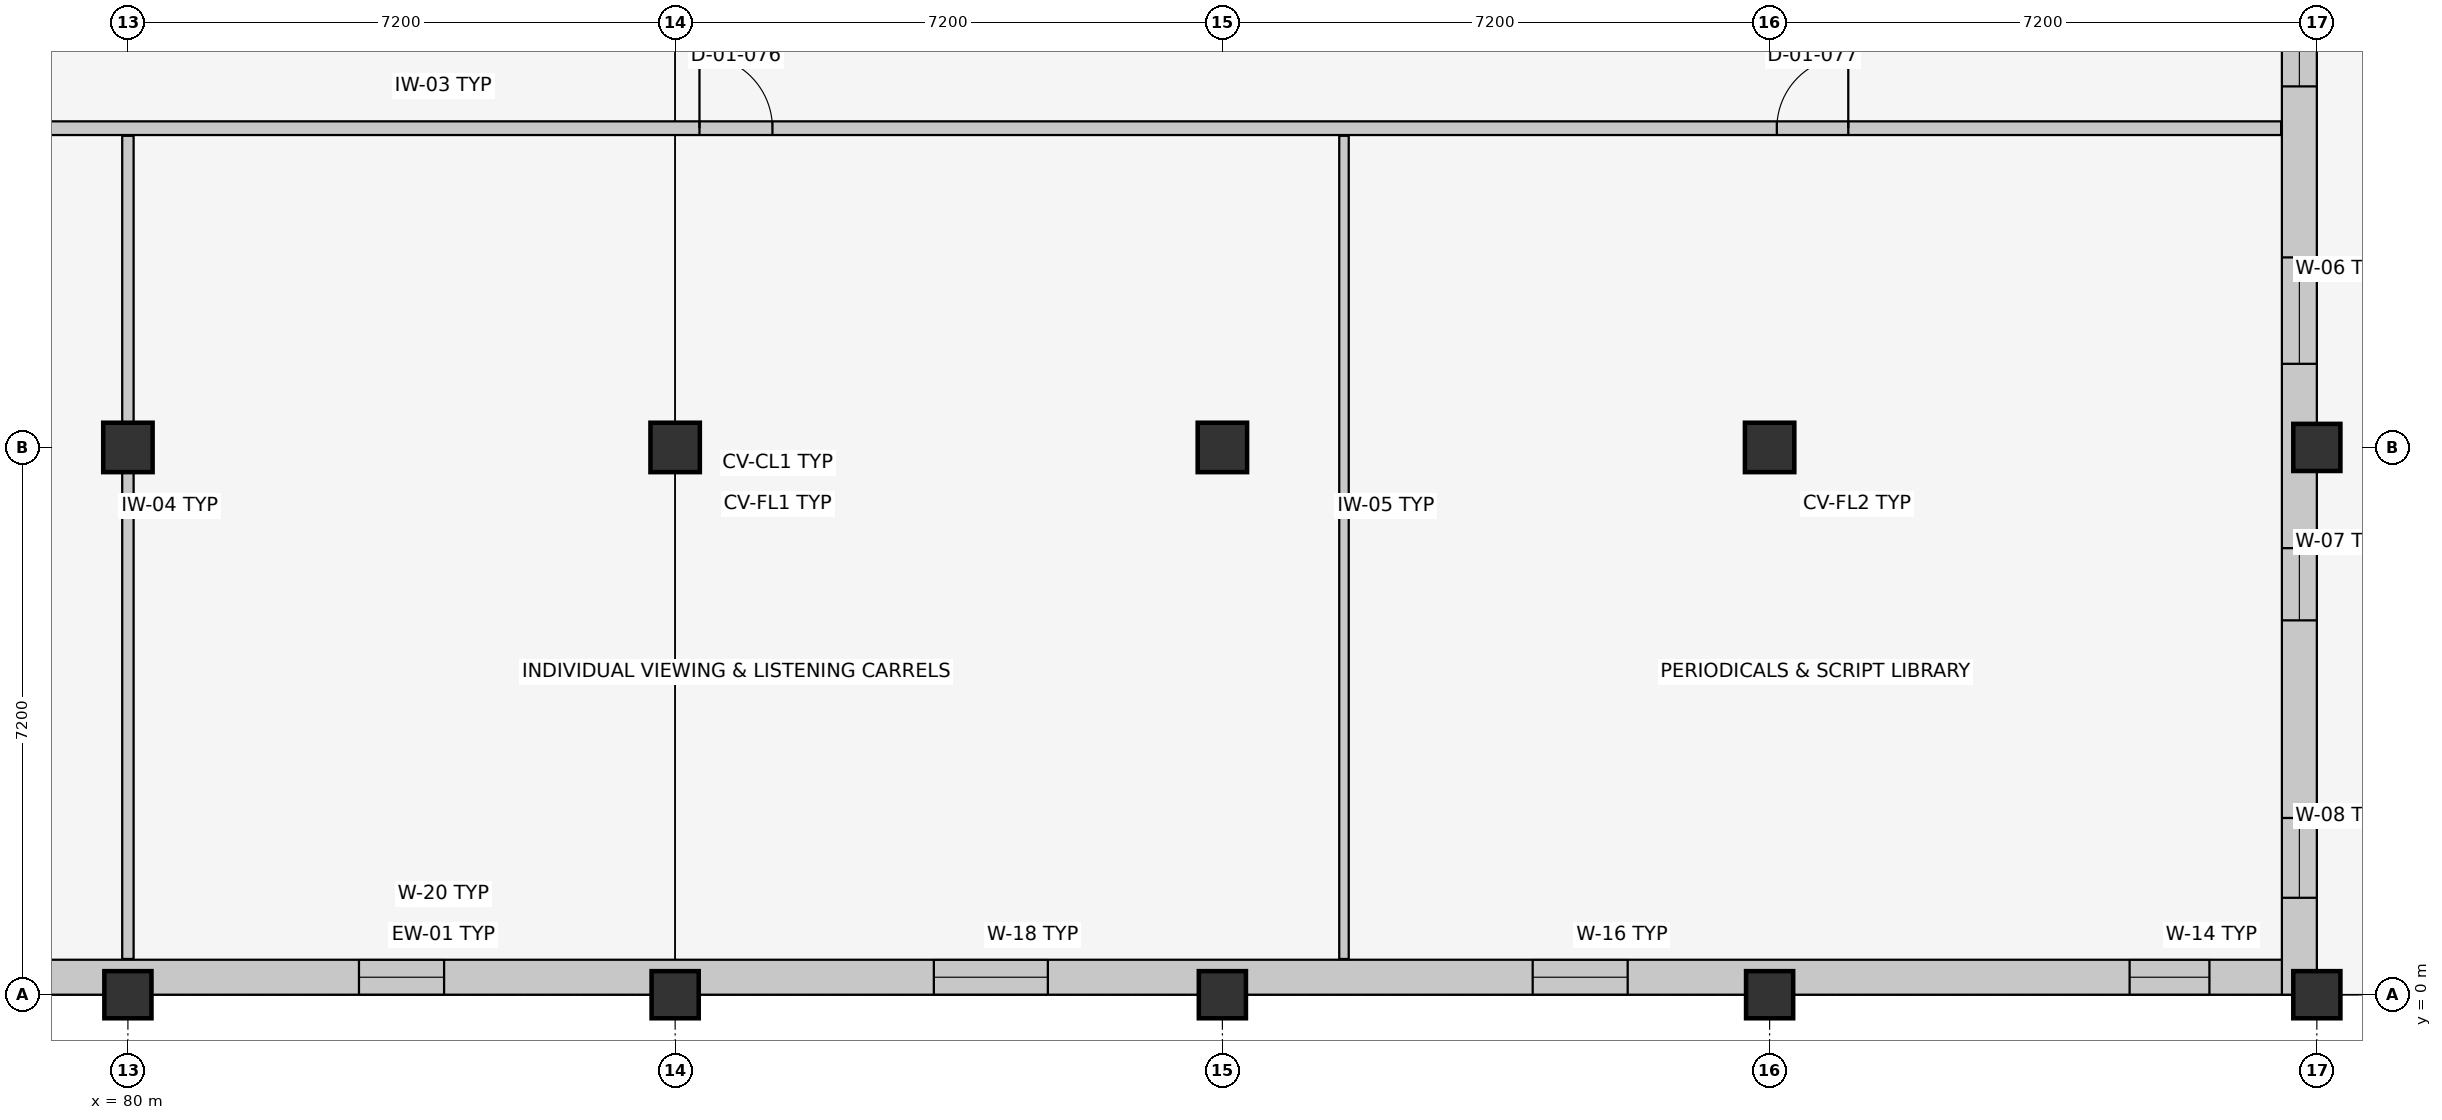
"""IFC4 building model, lengths in metres.
Left out: names, types, materials, properties, quantities, classifications, styles, units other than length and angle.
Written with IfcOpenShell. Run it as: python <this file> out.ifc"""

import sys

from ifc_helpers import new_model, si_unit, direction, frame, frame_2d, origin, origin_2d, place, context, subcontext, project, spatial, rectangle, extrude, element, fill, save


model = new_model("IFC4")
c1 = context("Model", 3, precision=1e-05, world=origin(), true_north=direction((0.0, 1.0)))
c2 = subcontext(c1, "Body", "Model", "MODEL_VIEW")
j1 = project(units=[si_unit("LENGTHUNIT", "METRE"), si_unit("PLANEANGLEUNIT", "RADIAN")], contexts=[c1])
p1 = place(None, origin())
s1 = spatial("IfcSite", under=j1, at=p1, CompositionType="ELEMENT")
p2 = place(p1, origin())
s2 = spatial("IfcBuilding", under=s1, at=p2, CompositionType="ELEMENT")
p3 = place(p2, frame((0.0, 0.0, 5.4)))
s3 = spatial("IfcBuildingStorey", under=s2, at=p3, CompositionType="ELEMENT", Elevation=5.4)
p4 = place(p3, frame((80.0, 0.0, 0.0), z_axis=(0.0, 0.0, 1.0), x_axis=(1.0, 0.0, 0.0)))
e1 = element("IfcColumn", 1, at=p4, inside=s3, PredefinedType="COLUMN", context=c2, shape_type="SweptSolid", body=[
    extrude(rectangle(XDim=0.62, YDim=0.62, at=origin_2d()), origin(), (0.0, 0.0, 1.0), 4.2),
])
p5 = place(p3, frame((80.0, 7.2, 0.0), z_axis=(0.0, 0.0, 1.0), x_axis=(1.0, 0.0, 0.0)))
e2 = element("IfcColumn", 2, at=p5, inside=s3, PredefinedType="COLUMN", context=c2, shape_type="SweptSolid", body=[
    extrude(rectangle(XDim=0.65, YDim=0.65, at=origin_2d()), origin(), (0.0, 0.0, 1.0), 4.2),
])
p6 = place(p3, frame((87.2, 0.0, 0.0), z_axis=(0.0, 0.0, 1.0), x_axis=(1.0, 0.0, 0.0)))
e3 = element("IfcColumn", 3, at=p6, inside=s3, PredefinedType="COLUMN", context=c2, shape_type="SweptSolid", body=[
    extrude(rectangle(XDim=0.62, YDim=0.62, at=origin_2d()), origin(), (0.0, 0.0, 1.0), 4.2),
])
p7 = place(p3, frame((87.2, 7.2, 0.0), z_axis=(0.0, 0.0, 1.0), x_axis=(1.0, 0.0, 0.0)))
e4 = element("IfcColumn", 4, at=p7, inside=s3, PredefinedType="COLUMN", context=c2, shape_type="SweptSolid", body=[
    extrude(rectangle(XDim=0.65, YDim=0.65, at=origin_2d()), origin(), (0.0, 0.0, 1.0), 4.2),
])
p8 = place(p3, frame((94.4, 0.0, 0.0), z_axis=(0.0, 0.0, 1.0), x_axis=(1.0, 0.0, 0.0)))
e5 = element("IfcColumn", 5, at=p8, inside=s3, PredefinedType="COLUMN", context=c2, shape_type="SweptSolid", body=[
    extrude(rectangle(XDim=0.62, YDim=0.62, at=origin_2d()), origin(), (0.0, 0.0, 1.0), 4.2),
])
p9 = place(p3, frame((94.4, 7.2, 0.0), z_axis=(0.0, 0.0, 1.0), x_axis=(1.0, 0.0, 0.0)))
e6 = element("IfcColumn", 6, at=p9, inside=s3, PredefinedType="COLUMN", context=c2, shape_type="SweptSolid", body=[
    extrude(rectangle(XDim=0.65, YDim=0.65, at=origin_2d()), origin(), (0.0, 0.0, 1.0), 4.2),
])
p10 = place(p3, frame((101.6, 0.0, 0.0), z_axis=(0.0, 0.0, 1.0), x_axis=(1.0, 0.0, 0.0)))
e7 = element("IfcColumn", 7, at=p10, inside=s3, PredefinedType="COLUMN", context=c2, shape_type="SweptSolid", body=[
    extrude(rectangle(XDim=0.62, YDim=0.62, at=origin_2d()), origin(), (0.0, 0.0, 1.0), 4.2),
])
p11 = place(p3, frame((101.6, 7.2, 0.0), z_axis=(0.0, 0.0, 1.0), x_axis=(1.0, 0.0, 0.0)))
e8 = element("IfcColumn", 8, at=p11, inside=s3, PredefinedType="COLUMN", context=c2, shape_type="SweptSolid", body=[
    extrude(rectangle(XDim=0.65, YDim=0.65, at=origin_2d()), origin(), (0.0, 0.0, 1.0), 4.2),
])
for number, where, z_axis, x_axis in (
    (9, (108.8, 0.0, 0.0), (0.0, 0.0, 1.0), (1.0, 0.0, 0.0)),
    (10, (108.8, 7.2, 0.0), (0.0, 0.0, 1.0), (1.0, 0.0, 0.0)),
):
    element("IfcColumn", number, at=place(p3, frame(where, z_axis=z_axis, x_axis=x_axis)), inside=s3, PredefinedType="COLUMN", context=c2, shape_type="SweptSolid", body=[
        extrude(rectangle(XDim=0.62, YDim=0.62, at=origin_2d()), origin(), (0.0, 0.0, 1.0), 4.2),
    ])
p12 = place(p3, frame((108.8, 0.23, 0.0), z_axis=(0.0, 0.0, 1.0), x_axis=(-1.0, 0.0, 0.0)))
e11 = element("IfcWall", 11, at=p12, inside=s3, PredefinedType="SOLIDWALL", context=c2, shape_type="SweptSolid", body=[
    extrude(rectangle(XDim=50.4, YDim=0.46, at=frame_2d((25.2, 0.0))), origin(), (0.0, 0.0, 1.0), 3.245),
])
p13 = place(p12, frame((1.414, 0.0, 0.9)))
e12 = element("IfcOpeningElement", 12, at=p13, cuts=e11, PredefinedType="OPENING", context=c2, shape_type="SweptSolid", body=[
    extrude(rectangle(XDim=1.05, YDim=1.6, at=frame_2d((0.525, 0.8))), frame((0.0, 0.242, 0.0), z_axis=(0.0, -1.0, 0.0), x_axis=(1.0, 0.0, 0.0)), (0.0, 0.0, 1.0), 0.484),
])
p14 = place(p12, frame((9.067, 0.0, 0.9)))
e13 = element("IfcOpeningElement", 13, at=p14, cuts=e11, PredefinedType="OPENING", context=c2, shape_type="SweptSolid", body=[
    extrude(rectangle(XDim=1.25, YDim=1.6, at=frame_2d((0.625, 0.8))), frame((0.0, 0.242, 0.0), z_axis=(0.0, -1.0, 0.0), x_axis=(1.0, 0.0, 0.0)), (0.0, 0.0, 1.0), 0.484),
])
p15 = place(p12, frame((16.696, 0.0, 0.9)))
e14 = element("IfcOpeningElement", 14, at=p15, cuts=e11, PredefinedType="OPENING", context=c2, shape_type="SweptSolid", body=[
    extrude(rectangle(XDim=1.5, YDim=1.6, at=frame_2d((0.75, 0.8))), frame((0.0, 0.242, 0.0), z_axis=(0.0, -1.0, 0.0), x_axis=(1.0, 0.0, 0.0)), (0.0, 0.0, 1.0), 0.484),
])
p16 = place(p12, frame((24.64, 0.0, 0.9)))
e15 = element("IfcOpeningElement", 15, at=p16, cuts=e11, PredefinedType="OPENING", context=c2, shape_type="SweptSolid", body=[
    extrude(rectangle(XDim=1.12, YDim=1.75, at=frame_2d((0.56, 0.875))), frame((0.0, 0.242, 0.0), z_axis=(0.0, -1.0, 0.0), x_axis=(1.0, 0.0, 0.0)), (0.0, 0.0, 1.0), 0.484),
])
p17 = place(p12, frame((32.284, 0.0, 0.9)))
e16 = element("IfcOpeningElement", 16, at=p17, cuts=e11, PredefinedType="OPENING", context=c2, shape_type="SweptSolid", body=[
    extrude(rectangle(XDim=1.34, YDim=1.75, at=frame_2d((0.67, 0.875))), frame((0.0, 0.242, 0.0), z_axis=(0.0, -1.0, 0.0), x_axis=(1.0, 0.0, 0.0)), (0.0, 0.0, 1.0), 0.484),
])
p18 = place(p12, frame((39.958, 0.0, 0.9)))
e17 = element("IfcOpeningElement", 17, at=p18, cuts=e11, PredefinedType="OPENING", context=c2, shape_type="SweptSolid", body=[
    extrude(rectangle(XDim=1.5, YDim=1.75, at=frame_2d((0.75, 0.875))), frame((0.0, 0.242, 0.0), z_axis=(0.0, -1.0, 0.0), x_axis=(1.0, 0.0, 0.0)), (0.0, 0.0, 1.0), 0.484),
])
p19 = place(p12, frame((44.135, 0.0, 0.9)))
e18 = element("IfcOpeningElement", 18, at=p19, cuts=e11, PredefinedType="OPENING", context=c2, shape_type="SweptSolid", body=[
    extrude(rectangle(XDim=0.9, YDim=1.35, at=frame_2d((0.45, 0.675))), frame((0.0, 0.242, 0.0), z_axis=(0.0, -1.0, 0.0), x_axis=(1.0, 0.0, 0.0)), (0.0, 0.0, 1.0), 0.484),
])
p20 = place(p12, frame((47.961, 0.0, 0.9)))
e19 = element("IfcOpeningElement", 19, at=p20, cuts=e11, PredefinedType="OPENING", context=c2, shape_type="SweptSolid", body=[
    extrude(rectangle(XDim=1.0, YDim=1.35, at=frame_2d((0.5, 0.675))), frame((0.0, 0.242, 0.0), z_axis=(0.0, -1.0, 0.0), x_axis=(1.0, 0.0, 0.0)), (0.0, 0.0, 1.0), 0.484),
])
p21 = place(p3, frame((108.57, 21.6, 0.0), z_axis=(0.0, 0.0, 1.0), x_axis=(0.0, -1.0, 0.0)))
e20 = element("IfcWall", 20, at=p21, inside=s3, PredefinedType="SOLIDWALL", context=c2, shape_type="SweptSolid", body=[
    extrude(rectangle(XDim=21.6, YDim=0.46, at=frame_2d((10.8, 0.0))), origin(), (0.0, 0.0, 1.0), 3.215),
])
p22 = place(p21, frame((1.25, 0.0, 0.9)))
e21 = element("IfcOpeningElement", 21, at=p22, cuts=e20, PredefinedType="OPENING", context=c2, shape_type="SweptSolid", body=[
    extrude(rectangle(XDim=1.1, YDim=1.35, at=frame_2d((0.55, 0.675))), frame((0.0, 0.242, 0.0), z_axis=(0.0, -1.0, 0.0), x_axis=(1.0, 0.0, 0.0)), (0.0, 0.0, 1.0), 0.484),
])
p23 = place(p21, frame((4.8, 0.0, 0.9)))
e22 = element("IfcOpeningElement", 22, at=p23, cuts=e20, PredefinedType="OPENING", context=c2, shape_type="SweptSolid", body=[
    extrude(rectangle(XDim=1.2, YDim=1.35, at=frame_2d((0.6, 0.675))), frame((0.0, 0.242, 0.0), z_axis=(0.0, -1.0, 0.0), x_axis=(1.0, 0.0, 0.0)), (0.0, 0.0, 1.0), 0.484),
])
p24 = place(p21, frame((8.35, 0.0, 0.9)))
e23 = element("IfcOpeningElement", 23, at=p24, cuts=e20, PredefinedType="OPENING", context=c2, shape_type="SweptSolid", body=[
    extrude(rectangle(XDim=1.3, YDim=1.35, at=frame_2d((0.65, 0.675))), frame((0.0, 0.242, 0.0), z_axis=(0.0, -1.0, 0.0), x_axis=(1.0, 0.0, 0.0)), (0.0, 0.0, 1.0), 0.484),
])
p25 = place(p21, frame((11.9, 0.0, 0.9)))
e24 = element("IfcOpeningElement", 24, at=p25, cuts=e20, PredefinedType="OPENING", context=c2, shape_type="SweptSolid", body=[
    extrude(rectangle(XDim=1.4, YDim=1.35, at=frame_2d((0.7, 0.675))), frame((0.0, 0.242, 0.0), z_axis=(0.0, -1.0, 0.0), x_axis=(1.0, 0.0, 0.0)), (0.0, 0.0, 1.0), 0.484),
])
p26 = place(p21, frame((15.725, 0.0, 0.9)))
e25 = element("IfcOpeningElement", 25, at=p26, cuts=e20, PredefinedType="OPENING", context=c2, shape_type="SweptSolid", body=[
    extrude(rectangle(XDim=0.95, YDim=1.45, at=frame_2d((0.475, 0.725))), frame((0.0, 0.242, 0.0), z_axis=(0.0, -1.0, 0.0), x_axis=(1.0, 0.0, 0.0)), (0.0, 0.0, 1.0), 0.484),
])
p27 = place(p21, frame((19.275, 0.0, 0.9)))
e26 = element("IfcOpeningElement", 26, at=p27, cuts=e20, PredefinedType="OPENING", context=c2, shape_type="SweptSolid", body=[
    extrude(rectangle(XDim=1.05, YDim=1.45, at=frame_2d((0.525, 0.725))), frame((0.0, 0.242, 0.0), z_axis=(0.0, -1.0, 0.0), x_axis=(1.0, 0.0, 0.0)), (0.0, 0.0, 1.0), 0.484),
])
p28 = place(p3, frame((58.87, 11.4, 0.0), z_axis=(0.0, 0.0, 1.0), x_axis=(1.0, 0.0, 0.0)))
e27 = element("IfcWall", 27, at=p28, inside=s3, PredefinedType="PARTITIONING", context=c2, shape_type="SweptSolid", body=[
    extrude(rectangle(XDim=49.46, YDim=0.18, at=frame_2d((24.73, 0.0))), origin(), (0.0, 0.0, 1.0), 3.95),
])
p29 = place(p28, frame((10.075, 0.0, 0.0)))
e28 = element("IfcOpeningElement", 28, at=p29, cuts=e27, PredefinedType="OPENING", context=c2, shape_type="SweptSolid", body=[
    extrude(rectangle(XDim=0.98, YDim=2.12, at=frame_2d((0.49, 1.06))), frame((0.0, 0.102, 0.0), z_axis=(0.0, -1.0, 0.0), x_axis=(1.0, 0.0, 0.0)), (0.0, 0.0, 1.0), 0.204),
])
p30 = place(p28, frame((28.65, 0.0, 0.0)))
e29 = element("IfcOpeningElement", 29, at=p30, cuts=e27, PredefinedType="OPENING", context=c2, shape_type="SweptSolid", body=[
    extrude(rectangle(XDim=0.96, YDim=2.1, at=frame_2d((0.48, 1.05))), frame((0.0, 0.102, 0.0), z_axis=(0.0, -1.0, 0.0), x_axis=(1.0, 0.0, 0.0)), (0.0, 0.0, 1.0), 0.204),
])
p31 = place(p28, frame((42.825, 0.0, 0.0)))
e30 = element("IfcOpeningElement", 30, at=p31, cuts=e27, PredefinedType="OPENING", context=c2, shape_type="SweptSolid", body=[
    extrude(rectangle(XDim=0.94, YDim=2.1, at=frame_2d((0.47, 1.05))), frame((0.0, 0.102, 0.0), z_axis=(0.0, -1.0, 0.0), x_axis=(1.0, 0.0, 0.0)), (0.0, 0.0, 1.0), 0.204),
])
p32 = place(p3, frame((80.0, 0.47, 0.0), z_axis=(0.0, 0.0, 1.0), x_axis=(0.0, 1.0, 0.0)))
e31 = element("IfcWall", 31, at=p32, inside=s3, PredefinedType="PARTITIONING", context=c2, shape_type="SweptSolid", body=[
    extrude(rectangle(XDim=10.83, YDim=0.15, at=frame_2d((5.415, 0.0))), origin(), (0.0, 0.0, 1.0), 3.325),
])
p33 = place(p3, frame((96.0, 0.47, 0.0), z_axis=(0.0, 0.0, 1.0), x_axis=(0.0, 1.0, 0.0)))
e32 = element("IfcWall", 32, at=p33, inside=s3, PredefinedType="PARTITIONING", context=c2, shape_type="SweptSolid", body=[
    extrude(rectangle(XDim=10.83, YDim=0.125, at=frame_2d((5.415, 0.0))), origin(), (0.0, 0.0, 1.0), 3.95),
])
p34 = place(p13, origin())
e33 = element("IfcWindow", 33, at=p34, inside=s3, PartitioningType="SINGLE_PANEL", PredefinedType="WINDOW", context=c2, shape_type="SweptSolid", body=[
    extrude(rectangle(XDim=1.05, YDim=1.6, at=frame_2d((0.525, 0.8))), frame((0.0, 0.03, 0.0), z_axis=(0.0, -1.0, 0.0), x_axis=(1.0, 0.0, 0.0)), (0.0, 0.0, 1.0), 0.06),
])
fill(e12, e33)
p35 = place(p14, origin())
e34 = element("IfcWindow", 34, at=p35, inside=s3, PartitioningType="SINGLE_PANEL", PredefinedType="WINDOW", context=c2, shape_type="SweptSolid", body=[
    extrude(rectangle(XDim=1.25, YDim=1.6, at=frame_2d((0.625, 0.8))), frame((0.0, 0.03, 0.0), z_axis=(0.0, -1.0, 0.0), x_axis=(1.0, 0.0, 0.0)), (0.0, 0.0, 1.0), 0.06),
])
fill(e13, e34)
p36 = place(p15, origin())
e35 = element("IfcWindow", 35, at=p36, inside=s3, PartitioningType="SINGLE_PANEL", PredefinedType="WINDOW", context=c2, shape_type="SweptSolid", body=[
    extrude(rectangle(XDim=1.5, YDim=1.6, at=frame_2d((0.75, 0.8))), frame((0.0, 0.03, 0.0), z_axis=(0.0, -1.0, 0.0), x_axis=(1.0, 0.0, 0.0)), (0.0, 0.0, 1.0), 0.06),
])
fill(e14, e35)
p37 = place(p16, origin())
e36 = element("IfcWindow", 36, at=p37, inside=s3, PartitioningType="SINGLE_PANEL", PredefinedType="WINDOW", context=c2, shape_type="SweptSolid", body=[
    extrude(rectangle(XDim=1.12, YDim=1.75, at=frame_2d((0.56, 0.875))), frame((0.0, 0.03, 0.0), z_axis=(0.0, -1.0, 0.0), x_axis=(1.0, 0.0, 0.0)), (0.0, 0.0, 1.0), 0.06),
])
fill(e15, e36)
p38 = place(p24, origin())
e37 = element("IfcWindow", 37, at=p38, inside=s3, PartitioningType="SINGLE_PANEL", PredefinedType="WINDOW", context=c2, shape_type="SweptSolid", body=[
    extrude(rectangle(XDim=1.3, YDim=1.35, at=frame_2d((0.65, 0.675))), frame((0.0, 0.03, 0.0), z_axis=(0.0, -1.0, 0.0), x_axis=(1.0, 0.0, 0.0)), (0.0, 0.0, 1.0), 0.06),
])
fill(e23, e37)
p39 = place(p25, origin())
e38 = element("IfcWindow", 38, at=p39, inside=s3, PartitioningType="SINGLE_PANEL", PredefinedType="WINDOW", context=c2, shape_type="SweptSolid", body=[
    extrude(rectangle(XDim=1.4, YDim=1.35, at=frame_2d((0.7, 0.675))), frame((0.0, 0.03, 0.0), z_axis=(0.0, -1.0, 0.0), x_axis=(1.0, 0.0, 0.0)), (0.0, 0.0, 1.0), 0.06),
])
fill(e24, e38)
p40 = place(p26, origin())
e39 = element("IfcWindow", 39, at=p40, inside=s3, PartitioningType="SINGLE_PANEL", PredefinedType="WINDOW", context=c2, shape_type="SweptSolid", body=[
    extrude(rectangle(XDim=0.95, YDim=1.45, at=frame_2d((0.475, 0.725))), frame((0.0, 0.03, 0.0), z_axis=(0.0, -1.0, 0.0), x_axis=(1.0, 0.0, 0.0)), (0.0, 0.0, 1.0), 0.06),
])
fill(e25, e39)
p41 = place(p27, origin())
e40 = element("IfcWindow", 40, at=p41, inside=s3, PartitioningType="SINGLE_PANEL", PredefinedType="WINDOW", context=c2, shape_type="SweptSolid", body=[
    extrude(rectangle(XDim=1.05, YDim=1.45, at=frame_2d((0.525, 0.725))), frame((0.0, 0.03, 0.0), z_axis=(0.0, -1.0, 0.0), x_axis=(1.0, 0.0, 0.0)), (0.0, 0.0, 1.0), 0.06),
])
fill(e26, e40)
p42 = place(p30, origin())
e41 = element("IfcDoor", 41, at=p42, inside=s3, OperationType="SINGLE_SWING_LEFT", PredefinedType="DOOR", context=c2, shape_type="SweptSolid", body=[
    extrude(rectangle(XDim=0.96, YDim=2.1, at=frame_2d((0.48, 1.05))), frame((0.0, 0.025, 0.0), z_axis=(0.0, -1.0, 0.0), x_axis=(1.0, 0.0, 0.0)), (0.0, 0.0, 1.0), 0.05),
])
fill(e29, e41)
p43 = place(p31, origin())
e42 = element("IfcDoor", 42, at=p43, inside=s3, OperationType="SINGLE_SWING_RIGHT", PredefinedType="DOOR", context=c2, shape_type="SweptSolid", body=[
    extrude(rectangle(XDim=0.94, YDim=2.1, at=frame_2d((0.47, 1.05))), frame((0.0, 0.025, 0.0), z_axis=(0.0, -1.0, 0.0), x_axis=(1.0, 0.0, 0.0)), (0.0, 0.0, 1.0), 0.05),
])
fill(e30, e42)
save(model, sys.argv[1])
